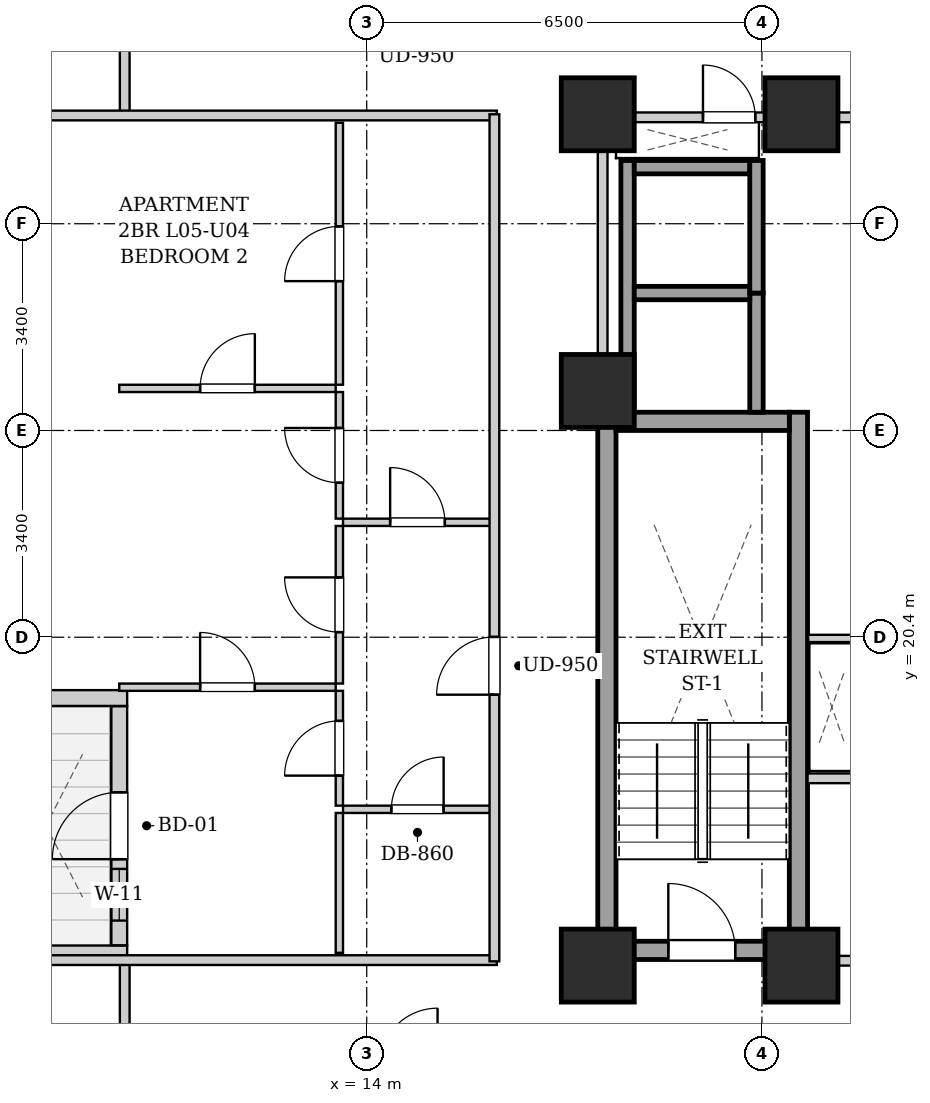
"""IFC4 building model, lengths in metres.
Left out: names, types, materials, properties, quantities, classifications, styles, units other than length and angle.
Written with IfcOpenShell. Run it as: python <this file> out.ifc"""

import sys

from ifc_helpers import new_model, si_unit, direction, frame, frame_2d, origin, origin_2d, place, context, subcontext, project, spatial, rectangle, extrude, element, fill, save


model = new_model("IFC4")
c1 = context("Model", 3, precision=1e-05, world=origin(), true_north=direction((0.0, 1.0)))
c2 = subcontext(c1, "Body", "Model", "MODEL_VIEW")
j1 = project(units=[si_unit("LENGTHUNIT", "METRE"), si_unit("PLANEANGLEUNIT", "RADIAN")], contexts=[c1])
p1 = place(None, origin())
s1 = spatial("IfcSite", under=j1, at=p1, CompositionType="ELEMENT")
p2 = place(p1, origin())
s2 = spatial("IfcBuilding", under=s1, at=p2, CompositionType="ELEMENT")
p3 = place(p2, frame((0.0, 0.0, 25.8)))
s3 = spatial("IfcBuildingStorey", under=s2, at=p3, CompositionType="ELEMENT", Elevation=25.8)
for number, where, z_axis, x_axis in (
    (1, (17.8, 15.0, 0.0), (0.0, 0.0, 1.0), (1.0, 0.0, 0.0)),
    (2, (21.15, 15.0, 0.0), (0.0, 0.0, 1.0), (1.0, 0.0, 0.0)),
    (3, (17.8, 29.0, 0.0), (0.0, 0.0, 1.0), (1.0, 0.0, 0.0)),
    (4, (21.15, 29.0, 0.0), (0.0, 0.0, 1.0), (1.0, 0.0, 0.0)),
    (5, (17.8, 24.45, 0.0), (0.0, 0.0, 1.0), (1.0, 0.0, 0.0)),
):
    element("IfcColumn", number, at=place(p3, frame(where, z_axis=z_axis, x_axis=x_axis)), inside=s3, PredefinedType="COLUMN", context=c2, shape_type="SweptSolid", body=[
        extrude(rectangle(XDim=1.2, YDim=1.2, at=origin_2d()), origin(), (0.0, 0.0, 1.0), 3.2),
    ])
p4 = place(p3, frame((7.66, 15.2, 0.0), z_axis=(0.0, 0.0, 1.0), x_axis=(1.0, 0.0, 0.0)))
e6 = element("IfcWall", 6, at=p4, inside=s3, PredefinedType="SOLIDWALL", context=c2, shape_type="SweptSolid", body=[
    extrude(rectangle(XDim=2.4, YDim=0.26, at=frame_2d((1.2, 0.0))), origin(), (0.0, 0.0, 1.0), 2.94),
])
p5 = place(p3, frame((9.93, 15.334, 0.0), z_axis=(0.0, 0.0, 1.0), x_axis=(0.0, 1.0, 0.0)))
e7 = element("IfcWall", 7, at=p5, inside=s3, PredefinedType="SOLIDWALL", context=c2, shape_type="SweptSolid", body=[
    extrude(rectangle(XDim=3.932, YDim=0.26, at=frame_2d((1.966, 0.0))), origin(), (0.0, 0.0, 1.0), 2.94),
])
p6 = place(p5, frame((1.416, 0.0, 0.0)))
e8 = element("IfcOpeningElement", 8, at=p6, cuts=e7, PredefinedType="OPENING", context=c2, shape_type="SweptSolid", body=[
    extrude(rectangle(XDim=1.1, YDim=2.0, at=frame_2d((0.55, 1.0))), frame((0.0, 0.14, 0.0), z_axis=(0.0, -1.0, 0.0), x_axis=(1.0, 0.0, 0.0)), (0.0, 0.0, 1.0), 0.28),
])
p7 = place(p5, frame((0.406, 0.0, 0.55)))
e9 = element("IfcOpeningElement", 9, at=p7, cuts=e7, PredefinedType="OPENING", context=c2, shape_type="SweptSolid", body=[
    extrude(rectangle(XDim=0.85, YDim=1.2, at=frame_2d((0.425, 0.6))), frame((0.0, 0.14, 0.0), z_axis=(0.0, -1.0, 0.0), x_axis=(1.0, 0.0, 0.0)), (0.0, 0.0, 1.0), 0.28),
])
p8 = place(p3, frame((10.06, 19.4, 0.0), z_axis=(0.0, 0.0, 1.0), x_axis=(-1.0, 0.0, 0.0)))
e10 = element("IfcWall", 10, at=p8, inside=s3, PredefinedType="SOLIDWALL", context=c2, shape_type="SweptSolid", body=[
    extrude(rectangle(XDim=2.4, YDim=0.26, at=frame_2d((1.2, 0.0))), origin(), (0.0, 0.0, 1.0), 2.94),
])
for number, where, z_axis, x_axis in (
    (11, (17.95, 15.1, 0.0), (0.0, 0.0, 1.0), (0.0, 1.0, 0.0)),
    (12, (21.1, 15.1, 0.0), (0.0, 0.0, 1.0), (0.0, 1.0, 0.0)),
):
    element("IfcWall", number, at=place(p3, frame(where, z_axis=z_axis, x_axis=x_axis)), inside=s3, PredefinedType="SHEAR", context=c2, shape_type="SweptSolid", body=[
        extrude(rectangle(XDim=9.0, YDim=0.3, at=frame_2d((4.5, 0.0))), origin(), (0.0, 0.0, 1.0), 2.94),
    ])
p9 = place(p3, frame((18.1, 23.95, 0.0), z_axis=(0.0, 0.0, 1.0), x_axis=(1.0, 0.0, 0.0)))
e13 = element("IfcWall", 13, at=p9, inside=s3, PredefinedType="SHEAR", context=c2, shape_type="SweptSolid", body=[
    extrude(rectangle(XDim=2.85, YDim=0.3, at=frame_2d((1.425, 0.0))), origin(), (0.0, 0.0, 1.0), 2.94),
])
p10 = place(p3, frame((18.1, 15.25, 0.0), z_axis=(0.0, 0.0, 1.0), x_axis=(1.0, 0.0, 0.0)))
e14 = element("IfcWall", 14, at=p10, inside=s3, PredefinedType="SHEAR", context=c2, shape_type="SweptSolid", body=[
    extrude(rectangle(XDim=2.85, YDim=0.3, at=frame_2d((1.425, 0.0))), origin(), (0.0, 0.0, 1.0), 2.94),
])
p11 = place(p10, frame((0.86, 0.0, 0.0)))
e15 = element("IfcOpeningElement", 15, at=p11, cuts=e14, PredefinedType="OPENING", context=c2, shape_type="SweptSolid", body=[
    extrude(rectangle(XDim=1.1, YDim=2.05, at=frame_2d((0.55, 1.025))), frame((0.0, 0.16, 0.0), z_axis=(0.0, -1.0, 0.0), x_axis=(1.0, 0.0, 0.0)), (0.0, 0.0, 1.0), 0.32),
])
p12 = place(p3, frame((18.29, 24.1, 0.0), z_axis=(0.0, 0.0, 1.0), x_axis=(0.0, 1.0, 0.0)))
e16 = element("IfcWall", 16, at=p12, inside=s3, PredefinedType="SHEAR", context=c2, shape_type="SweptSolid", body=[
    extrude(rectangle(XDim=4.14, YDim=0.22, at=frame_2d((2.07, 0.0))), origin(), (0.0, 0.0, 1.0), 2.94),
])
p13 = place(p3, frame((20.41, 24.1, 0.0), z_axis=(0.0, 0.0, 1.0), x_axis=(0.0, 1.0, 0.0)))
e17 = element("IfcWall", 17, at=p13, inside=s3, PredefinedType="SHEAR", context=c2, shape_type="SweptSolid", body=[
    extrude(rectangle(XDim=1.96, YDim=0.22, at=frame_2d((0.98, 0.0))), origin(), (0.0, 0.0, 1.0), 2.94),
])
for number, where, z_axis, x_axis in (
    (18, (18.4, 26.06, 0.0), (0.0, 0.0, 1.0), (1.0, 0.0, 0.0)),
    (19, (18.4, 28.13, 0.0), (0.0, 0.0, 1.0), (1.0, 0.0, 0.0)),
):
    element("IfcWall", number, at=place(p3, frame(where, z_axis=z_axis, x_axis=x_axis)), inside=s3, PredefinedType="SHEAR", context=c2, shape_type="SweptSolid", body=[
        extrude(rectangle(XDim=1.9, YDim=0.22, at=frame_2d((0.95, 0.0))), origin(), (0.0, 0.0, 1.0), 2.94),
    ])
p14 = place(p3, frame((20.41, 26.06, 0.0), z_axis=(0.0, 0.0, 1.0), x_axis=(0.0, 1.0, 0.0)))
e20 = element("IfcWall", 20, at=p14, inside=s3, PredefinedType="SHEAR", context=c2, shape_type="SweptSolid", body=[
    extrude(rectangle(XDim=2.18, YDim=0.22, at=frame_2d((1.09, 0.0))), origin(), (0.0, 0.0, 1.0), 2.94),
])
p15 = place(p3, frame((21.25, 15.08, 0.0), z_axis=(0.0, 0.0, 1.0), x_axis=(1.0, 0.0, 0.0)))
e21 = element("IfcWall", 21, at=p15, inside=s3, PredefinedType="PARTITIONING", context=c2, shape_type="SweptSolid", body=[
    extrude(rectangle(XDim=8.5, YDim=0.16, at=frame_2d((4.25, 0.0))), origin(), (0.0, 0.0, 1.0), 2.155),
])
p16 = place(p15, frame((3.725, 0.0, 0.0)))
e22 = element("IfcOpeningElement", 22, at=p16, cuts=e21, PredefinedType="OPENING", context=c2, shape_type="SweptSolid", body=[
    extrude(rectangle(XDim=1.05, YDim=2.05, at=frame_2d((0.525, 1.025))), frame((0.0, 0.09, 0.0), z_axis=(0.0, -1.0, 0.0), x_axis=(1.0, 0.0, 0.0)), (0.0, 0.0, 1.0), 0.18),
])
p17 = place(p3, frame((21.25, 18.08, 0.0), z_axis=(0.0, 0.0, 1.0), x_axis=(1.0, 0.0, 0.0)))
e23 = element("IfcWall", 23, at=p17, inside=s3, PredefinedType="PARTITIONING", context=c2, shape_type="SweptSolid", body=[
    extrude(rectangle(XDim=1.1, YDim=0.16, at=frame_2d((0.55, 0.0))), origin(), (0.0, 0.0, 1.0), 2.94),
])
p18 = place(p3, frame((17.88, 24.12, 0.0), z_axis=(0.0, 0.0, 1.0), x_axis=(0.0, 1.0, 0.0)))
e24 = element("IfcWall", 24, at=p18, inside=s3, PredefinedType="PARTITIONING", context=c2, shape_type="SweptSolid", body=[
    extrude(rectangle(XDim=4.76, YDim=0.16, at=frame_2d((2.38, 0.0))), origin(), (0.0, 0.0, 1.0), 2.94),
])
p19 = place(p3, frame((17.96, 28.95, 0.0), z_axis=(0.0, 0.0, 1.0), x_axis=(1.0, 0.0, 0.0)))
e25 = element("IfcWall", 25, at=p19, inside=s3, PredefinedType="PARTITIONING", context=c2, shape_type="SweptSolid", body=[
    extrude(rectangle(XDim=4.29, YDim=0.16, at=frame_2d((2.145, 0.0))), origin(), (0.0, 0.0, 1.0), 2.155),
])
p20 = place(p19, frame((1.57, 0.0, 0.0)))
e26 = element("IfcOpeningElement", 26, at=p20, cuts=e25, PredefinedType="OPENING", context=c2, shape_type="SweptSolid", body=[
    extrude(rectangle(XDim=0.86, YDim=2.05, at=frame_2d((0.43, 1.025))), frame((0.0, 0.09, 0.0), z_axis=(0.0, -1.0, 0.0), x_axis=(1.0, 0.0, 0.0)), (0.0, 0.0, 1.0), 0.18),
])
p21 = place(p3, frame((22.28, 20.38, 0.0), z_axis=(0.0, 0.0, 1.0), x_axis=(-1.0, 0.0, 0.0)))
e27 = element("IfcWall", 27, at=p21, inside=s3, PredefinedType="PARTITIONING", context=c2, shape_type="SweptSolid", body=[
    extrude(rectangle(XDim=1.02, YDim=0.12, at=frame_2d((0.51, 0.0))), origin(), (0.0, 0.0, 1.0), 2.94),
])
for number, where, z_axis, x_axis in (
    (28, (10.02, 13.35, 0.0), (0.0, 0.0, 1.0), (0.0, 1.0, 0.0)),
    (29, (10.02, 28.98, 0.0), (0.0, 0.0, 1.0), (0.0, 1.0, 0.0)),
):
    element("IfcWall", number, at=place(p3, frame(where, z_axis=z_axis, x_axis=x_axis)), inside=s3, PredefinedType="PARTITIONING", context=c2, shape_type="SweptSolid", body=[
        extrude(rectangle(XDim=1.74, YDim=0.16, at=frame_2d((0.87, 0.0))), origin(), (0.0, 0.0, 1.0), 2.94),
    ])
for number, where, z_axis, x_axis in (
    (30, (7.78, 15.09, 0.0), (0.0, 0.0, 1.0), (1.0, 0.0, 0.0)),
    (31, (7.78, 28.98, 0.0), (0.0, 0.0, 1.0), (1.0, 0.0, 0.0)),
):
    element("IfcWall", number, at=place(p3, frame(where, z_axis=z_axis, x_axis=x_axis)), inside=s3, PredefinedType="PARTITIONING", context=c2, shape_type="SweptSolid", body=[
        extrude(rectangle(XDim=8.36, YDim=0.16, at=frame_2d((4.18, 0.0))), origin(), (0.0, 0.0, 1.0), 2.155),
    ])
p22 = place(p3, frame((13.61, 22.29, 0.0), z_axis=(0.0, 0.0, 1.0), x_axis=(1.0, 0.0, 0.0)))
e32 = element("IfcWall", 32, at=p22, inside=s3, PredefinedType="PARTITIONING", context=c2, shape_type="SweptSolid", body=[
    extrude(rectangle(XDim=2.45, YDim=0.12, at=frame_2d((1.225, 0.0))), origin(), (0.0, 0.0, 1.0), 2.94),
])
p23 = place(p22, frame((0.775, 0.0, 0.0)))
e33 = element("IfcOpeningElement", 33, at=p23, cuts=e32, PredefinedType="OPENING", context=c2, shape_type="SweptSolid", body=[
    extrude(rectangle(XDim=0.9, YDim=2.05, at=frame_2d((0.45, 1.025))), frame((0.0, 0.07, 0.0), z_axis=(0.0, -1.0, 0.0), x_axis=(1.0, 0.0, 0.0)), (0.0, 0.0, 1.0), 0.14),
])
p24 = place(p3, frame((13.55, 22.35, 0.0), z_axis=(0.0, 0.0, 1.0), x_axis=(0.0, 1.0, 0.0)))
e34 = element("IfcWall", 34, at=p24, inside=s3, PredefinedType="PARTITIONING", context=c2, shape_type="SweptSolid", body=[
    extrude(rectangle(XDim=2.082, YDim=0.12, at=frame_2d((1.041, 0.0))), origin(), (0.0, 0.0, 1.0), 2.94),
])
p25 = place(p24, frame((0.591, 0.0, 0.0)))
e35 = element("IfcOpeningElement", 35, at=p25, cuts=e34, PredefinedType="OPENING", context=c2, shape_type="SweptSolid", body=[
    extrude(rectangle(XDim=0.9, YDim=2.05, at=frame_2d((0.45, 1.025))), frame((0.0, 0.07, 0.0), z_axis=(0.0, -1.0, 0.0), x_axis=(1.0, 0.0, 0.0)), (0.0, 0.0, 1.0), 0.14),
])
p26 = place(p3, frame((13.55, 24.552, 0.0), z_axis=(0.0, 0.0, 1.0), x_axis=(0.0, 1.0, 0.0)))
e36 = element("IfcWall", 36, at=p26, inside=s3, PredefinedType="PARTITIONING", context=c2, shape_type="SweptSolid", body=[
    extrude(rectangle(XDim=4.308, YDim=0.12, at=frame_2d((2.154, 0.0))), origin(), (0.0, 0.0, 1.0), 2.94),
])
p27 = place(p26, frame((1.704, 0.0, 0.0)))
e37 = element("IfcOpeningElement", 37, at=p27, cuts=e36, PredefinedType="OPENING", context=c2, shape_type="SweptSolid", body=[
    extrude(rectangle(XDim=0.9, YDim=2.05, at=frame_2d((0.45, 1.025))), frame((0.0, 0.07, 0.0), z_axis=(0.0, -1.0, 0.0), x_axis=(1.0, 0.0, 0.0)), (0.0, 0.0, 1.0), 0.14),
])
p28 = place(p3, frame((13.61, 17.57, 0.0), z_axis=(0.0, 0.0, 1.0), x_axis=(1.0, 0.0, 0.0)))
e38 = element("IfcWall", 38, at=p28, inside=s3, PredefinedType="PARTITIONING", context=c2, shape_type="SweptSolid", body=[
    extrude(rectangle(XDim=2.45, YDim=0.12, at=frame_2d((1.225, 0.0))), origin(), (0.0, 0.0, 1.0), 2.94),
])
p29 = place(p28, frame((0.795, 0.0, 0.0)))
e39 = element("IfcOpeningElement", 39, at=p29, cuts=e38, PredefinedType="OPENING", context=c2, shape_type="SweptSolid", body=[
    extrude(rectangle(XDim=0.86, YDim=2.05, at=frame_2d((0.43, 1.025))), frame((0.0, 0.07, 0.0), z_axis=(0.0, -1.0, 0.0), x_axis=(1.0, 0.0, 0.0)), (0.0, 0.0, 1.0), 0.14),
])
p30 = place(p3, frame((13.55, 15.21, 0.0), z_axis=(0.0, 0.0, 1.0), x_axis=(0.0, 1.0, 0.0)))
e40 = element("IfcWall", 40, at=p30, inside=s3, PredefinedType="PARTITIONING", context=c2, shape_type="SweptSolid", body=[
    extrude(rectangle(XDim=2.3, YDim=0.12, at=frame_2d((1.15, 0.0))), origin(), (0.0, 0.0, 1.0), 2.94),
])
p31 = place(p3, frame((13.55, 17.63, 0.0), z_axis=(0.0, 0.0, 1.0), x_axis=(0.0, 1.0, 0.0)))
e41 = element("IfcWall", 41, at=p31, inside=s3, PredefinedType="PARTITIONING", context=c2, shape_type="SweptSolid", body=[
    extrude(rectangle(XDim=1.888, YDim=0.12, at=frame_2d((0.944, 0.0))), origin(), (0.0, 0.0, 1.0), 2.94),
])
p32 = place(p31, frame((0.494, 0.0, 0.0)))
e42 = element("IfcOpeningElement", 42, at=p32, cuts=e41, PredefinedType="OPENING", context=c2, shape_type="SweptSolid", body=[
    extrude(rectangle(XDim=0.9, YDim=2.05, at=frame_2d((0.45, 1.025))), frame((0.0, 0.07, 0.0), z_axis=(0.0, -1.0, 0.0), x_axis=(1.0, 0.0, 0.0)), (0.0, 0.0, 1.0), 0.14),
])
p33 = place(p3, frame((13.55, 19.638, 0.0), z_axis=(0.0, 0.0, 1.0), x_axis=(0.0, 1.0, 0.0)))
e43 = element("IfcWall", 43, at=p33, inside=s3, PredefinedType="PARTITIONING", context=c2, shape_type="SweptSolid", body=[
    extrude(rectangle(XDim=2.592, YDim=0.12, at=frame_2d((1.296, 0.0))), origin(), (0.0, 0.0, 1.0), 2.94),
])
p34 = place(p33, frame((0.846, 0.0, 0.0)))
e44 = element("IfcOpeningElement", 44, at=p34, cuts=e43, PredefinedType="OPENING", context=c2, shape_type="SweptSolid", body=[
    extrude(rectangle(XDim=0.9, YDim=2.05, at=frame_2d((0.45, 1.025))), frame((0.0, 0.07, 0.0), z_axis=(0.0, -1.0, 0.0), x_axis=(1.0, 0.0, 0.0)), (0.0, 0.0, 1.0), 0.14),
])
p35 = place(p3, frame((9.93, 19.578, 0.0), z_axis=(0.0, 0.0, 1.0), x_axis=(1.0, 0.0, 0.0)))
e45 = element("IfcWall", 45, at=p35, inside=s3, PredefinedType="PARTITIONING", context=c2, shape_type="SweptSolid", body=[
    extrude(rectangle(XDim=3.56, YDim=0.12, at=frame_2d((1.78, 0.0))), origin(), (0.0, 0.0, 1.0), 2.94),
])
p36 = place(p35, frame((1.33, 0.0, 0.0)))
e46 = element("IfcOpeningElement", 46, at=p36, cuts=e45, PredefinedType="OPENING", context=c2, shape_type="SweptSolid", body=[
    extrude(rectangle(XDim=0.9, YDim=2.05, at=frame_2d((0.45, 1.025))), frame((0.0, 0.07, 0.0), z_axis=(0.0, -1.0, 0.0), x_axis=(1.0, 0.0, 0.0)), (0.0, 0.0, 1.0), 0.14),
])
p37 = place(p3, frame((9.93, 24.492, 0.0), z_axis=(0.0, 0.0, 1.0), x_axis=(1.0, 0.0, 0.0)))
e47 = element("IfcWall", 47, at=p37, inside=s3, PredefinedType="PARTITIONING", context=c2, shape_type="SweptSolid", body=[
    extrude(rectangle(XDim=3.56, YDim=0.12, at=frame_2d((1.78, 0.0))), origin(), (0.0, 0.0, 1.0), 2.508),
])
p38 = place(p37, frame((1.33, 0.0, 0.0)))
e48 = element("IfcOpeningElement", 48, at=p38, cuts=e47, PredefinedType="OPENING", context=c2, shape_type="SweptSolid", body=[
    extrude(rectangle(XDim=0.9, YDim=2.05, at=frame_2d((0.45, 1.025))), frame((0.0, 0.07, 0.0), z_axis=(0.0, -1.0, 0.0), x_axis=(1.0, 0.0, 0.0)), (0.0, 0.0, 1.0), 0.14),
])
p39 = place(p3, frame((16.1, 15.07, 0.0), z_axis=(0.0, 0.0, 1.0), x_axis=(0.0, 1.0, 0.0)))
e49 = element("IfcWall", 49, at=p39, inside=s3, PredefinedType="PARTITIONING", context=c2, shape_type="SweptSolid", body=[
    extrude(rectangle(XDim=13.93, YDim=0.16, at=frame_2d((6.965, 0.0))), origin(), (0.0, 0.0, 1.0), 2.94),
])
p40 = place(p39, frame((4.385, 0.0, 0.0)))
e50 = element("IfcOpeningElement", 50, at=p40, cuts=e49, PredefinedType="OPENING", context=c2, shape_type="SweptSolid", body=[
    extrude(rectangle(XDim=0.95, YDim=2.1, at=frame_2d((0.475, 1.05))), frame((0.0, 0.09, 0.0), z_axis=(0.0, -1.0, 0.0), x_axis=(1.0, 0.0, 0.0)), (0.0, 0.0, 1.0), 0.18),
])
p41 = place(p11, origin())
e51 = element("IfcDoor", 51, at=p41, inside=s3, OperationType="SINGLE_SWING_LEFT", PredefinedType="DOOR", context=c2, shape_type="SweptSolid", body=[
    extrude(rectangle(XDim=1.1, YDim=2.05, at=frame_2d((0.55, 1.025))), frame((0.0, 0.025, 0.0), z_axis=(0.0, -1.0, 0.0), x_axis=(1.0, 0.0, 0.0)), (0.0, 0.0, 1.0), 0.05),
])
fill(e15, e51)
p42 = place(p20, origin())
e52 = element("IfcDoor", 52, at=p42, inside=s3, OperationType="SINGLE_SWING_LEFT", PredefinedType="DOOR", context=c2, shape_type="SweptSolid", body=[
    extrude(rectangle(XDim=0.86, YDim=2.05, at=frame_2d((0.43, 1.025))), frame((0.0, 0.025, 0.0), z_axis=(0.0, -1.0, 0.0), x_axis=(1.0, 0.0, 0.0)), (0.0, 0.0, 1.0), 0.05),
])
fill(e26, e52)
p43 = place(p23, origin())
e53 = element("IfcDoor", 53, at=p43, inside=s3, OperationType="SINGLE_SWING_LEFT", PredefinedType="DOOR", context=c2, shape_type="SweptSolid", body=[
    extrude(rectangle(XDim=0.9, YDim=2.05, at=frame_2d((0.45, 1.025))), frame((0.0, 0.025, 0.0), z_axis=(0.0, -1.0, 0.0), x_axis=(1.0, 0.0, 0.0)), (0.0, 0.0, 1.0), 0.05),
])
fill(e33, e53)
p44 = place(p25, origin())
e54 = element("IfcDoor", 54, at=p44, inside=s3, OperationType="SINGLE_SWING_RIGHT", PredefinedType="DOOR", context=c2, shape_type="SweptSolid", body=[
    extrude(rectangle(XDim=0.9, YDim=2.05, at=frame_2d((0.45, 1.025))), frame((0.0, 0.025, 0.0), z_axis=(0.0, -1.0, 0.0), x_axis=(1.0, 0.0, 0.0)), (0.0, 0.0, 1.0), 0.05),
])
fill(e35, e54)
p45 = place(p27, origin())
e55 = element("IfcDoor", 55, at=p45, inside=s3, OperationType="SINGLE_SWING_LEFT", PredefinedType="DOOR", context=c2, shape_type="SweptSolid", body=[
    extrude(rectangle(XDim=0.9, YDim=2.05, at=frame_2d((0.45, 1.025))), frame((0.0, 0.025, 0.0), z_axis=(0.0, -1.0, 0.0), x_axis=(1.0, 0.0, 0.0)), (0.0, 0.0, 1.0), 0.05),
])
fill(e37, e55)
p46 = place(p29, origin())
e56 = element("IfcDoor", 56, at=p46, inside=s3, OperationType="SINGLE_SWING_RIGHT", PredefinedType="DOOR", context=c2, shape_type="SweptSolid", body=[
    extrude(rectangle(XDim=0.86, YDim=2.05, at=frame_2d((0.43, 1.025))), frame((0.0, 0.025, 0.0), z_axis=(0.0, -1.0, 0.0), x_axis=(1.0, 0.0, 0.0)), (0.0, 0.0, 1.0), 0.05),
])
fill(e39, e56)
p47 = place(p32, origin())
e57 = element("IfcDoor", 57, at=p47, inside=s3, OperationType="SINGLE_SWING_LEFT", PredefinedType="DOOR", context=c2, shape_type="SweptSolid", body=[
    extrude(rectangle(XDim=0.9, YDim=2.05, at=frame_2d((0.45, 1.025))), frame((0.0, 0.025, 0.0), z_axis=(0.0, -1.0, 0.0), x_axis=(1.0, 0.0, 0.0)), (0.0, 0.0, 1.0), 0.05),
])
fill(e42, e57)
p48 = place(p34, origin())
e58 = element("IfcDoor", 58, at=p48, inside=s3, OperationType="SINGLE_SWING_RIGHT", PredefinedType="DOOR", context=c2, shape_type="SweptSolid", body=[
    extrude(rectangle(XDim=0.9, YDim=2.05, at=frame_2d((0.45, 1.025))), frame((0.0, 0.025, 0.0), z_axis=(0.0, -1.0, 0.0), x_axis=(1.0, 0.0, 0.0)), (0.0, 0.0, 1.0), 0.05),
])
fill(e44, e58)
p49 = place(p36, origin())
e59 = element("IfcDoor", 59, at=p49, inside=s3, OperationType="SINGLE_SWING_LEFT", PredefinedType="DOOR", context=c2, shape_type="SweptSolid", body=[
    extrude(rectangle(XDim=0.9, YDim=2.05, at=frame_2d((0.45, 1.025))), frame((0.0, 0.025, 0.0), z_axis=(0.0, -1.0, 0.0), x_axis=(1.0, 0.0, 0.0)), (0.0, 0.0, 1.0), 0.05),
])
fill(e46, e59)
p50 = place(p38, origin())
e60 = element("IfcDoor", 60, at=p50, inside=s3, OperationType="SINGLE_SWING_RIGHT", PredefinedType="DOOR", context=c2, shape_type="SweptSolid", body=[
    extrude(rectangle(XDim=0.9, YDim=2.05, at=frame_2d((0.45, 1.025))), frame((0.0, 0.025, 0.0), z_axis=(0.0, -1.0, 0.0), x_axis=(1.0, 0.0, 0.0)), (0.0, 0.0, 1.0), 0.05),
])
fill(e48, e60)
p51 = place(p40, origin())
e61 = element("IfcDoor", 61, at=p51, inside=s3, OperationType="SINGLE_SWING_LEFT", PredefinedType="DOOR", context=c2, shape_type="SweptSolid", body=[
    extrude(rectangle(XDim=0.95, YDim=2.1, at=frame_2d((0.475, 1.05))), frame((0.0, 0.025, 0.0), z_axis=(0.0, -1.0, 0.0), x_axis=(1.0, 0.0, 0.0)), (0.0, 0.0, 1.0), 0.05),
])
fill(e50, e61)
p52 = place(p6, origin())
e62 = element("IfcDoor", 62, at=p52, inside=s3, OperationType="SINGLE_SWING_LEFT", PredefinedType="DOOR", context=c2, shape_type="SweptSolid", body=[
    extrude(rectangle(XDim=1.1, YDim=2.0, at=frame_2d((0.55, 1.0))), frame((0.0, 0.025, 0.0), z_axis=(0.0, -1.0, 0.0), x_axis=(1.0, 0.0, 0.0)), (0.0, 0.0, 1.0), 0.05),
])
fill(e8, e62)
p53 = place(p7, origin())
e63 = element("IfcWindow", 63, at=p53, inside=s3, PartitioningType="SINGLE_PANEL", PredefinedType="WINDOW", context=c2, shape_type="SweptSolid", body=[
    extrude(rectangle(XDim=0.85, YDim=1.2, at=frame_2d((0.425, 0.6))), frame((0.0, 0.03, 0.0), z_axis=(0.0, -1.0, 0.0), x_axis=(1.0, 0.0, 0.0)), (0.0, 0.0, 1.0), 0.06),
])
fill(e9, e63)
save(model, sys.argv[1])
